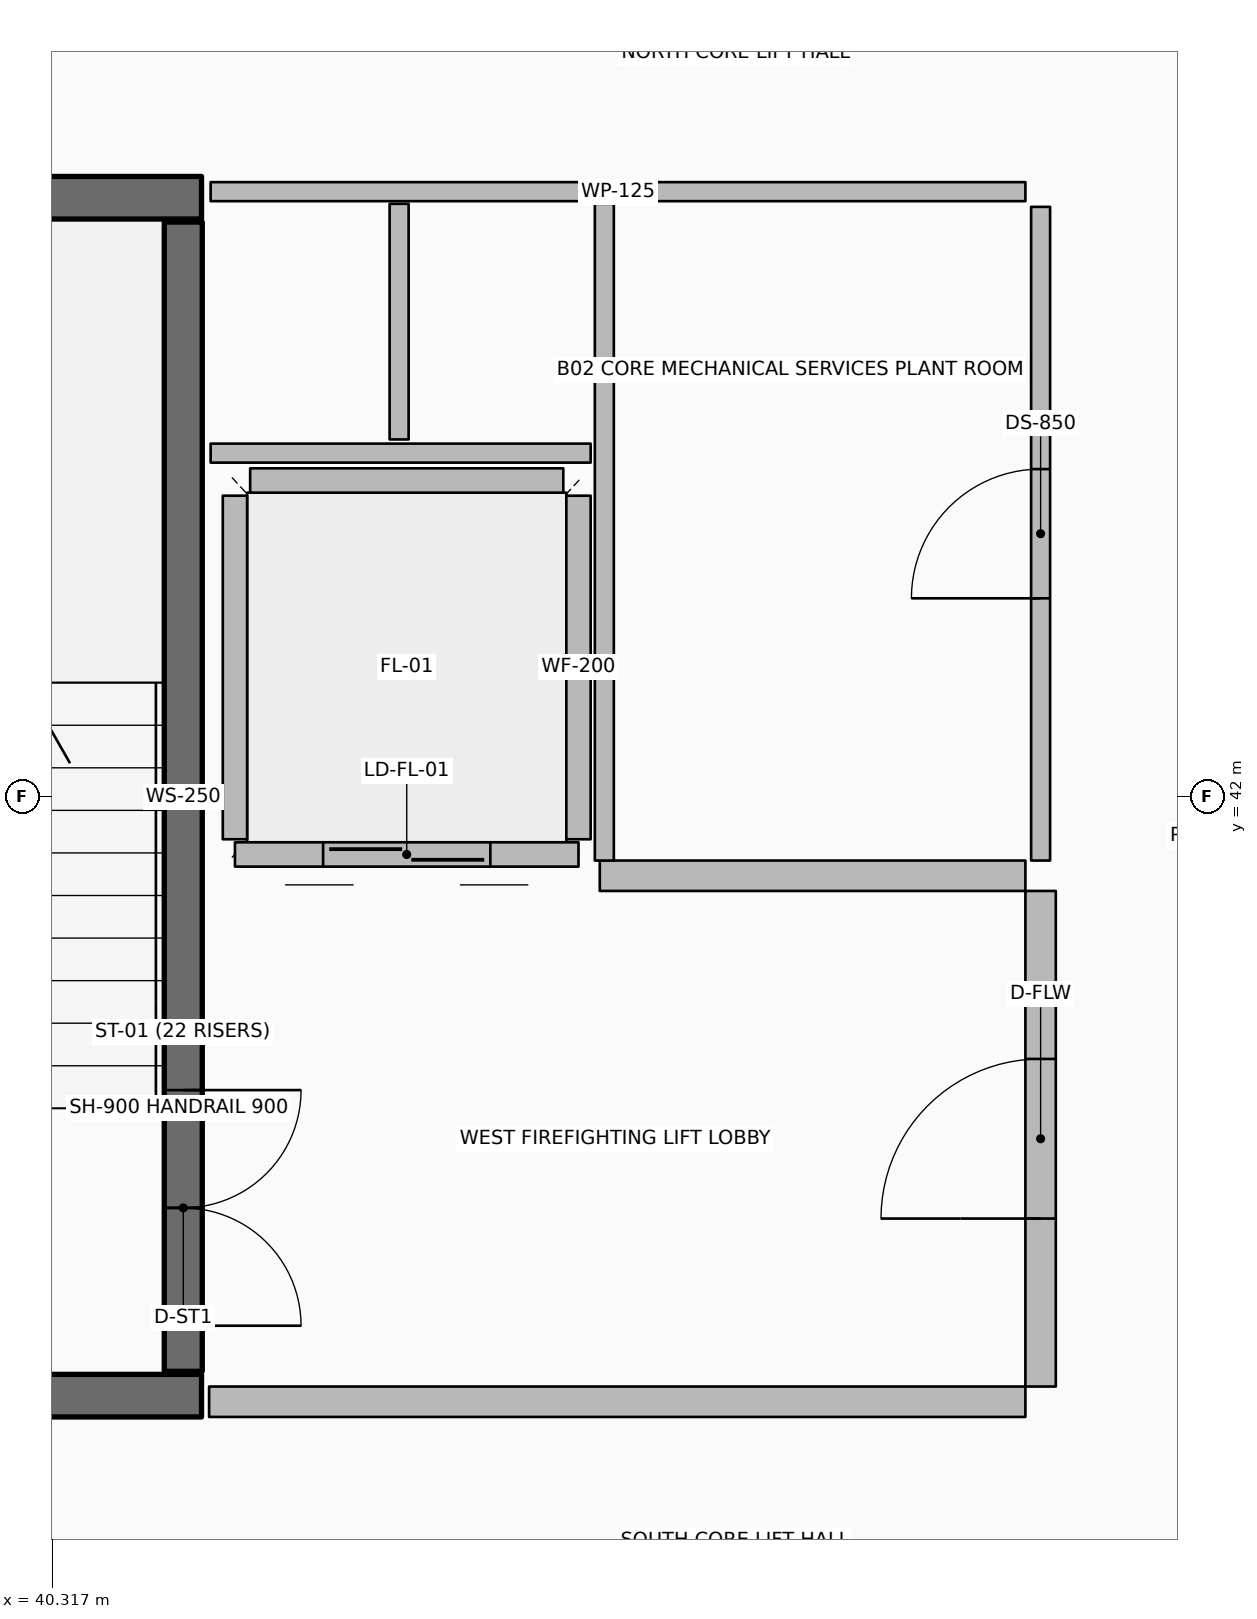
"""IFC4 building model, lengths in metres.
Left out: names, types, materials, properties, quantities, classifications, styles, units other than length and angle.
Written with IfcOpenShell. Run it as: python <this file> out.ifc"""

import sys

from ifc_helpers import new_model, si_unit, direction, frame, frame_2d, origin, origin_2d, place, context, subcontext, project, spatial, rectangle, hollow_rectangle, extrude, element, fill, save


model = new_model("IFC4")
c1 = context("Model", 3, precision=1e-05, world=origin(), true_north=direction((0.0, 1.0)))
c2 = subcontext(c1, "Body", "Model", "MODEL_VIEW")
j1 = project(units=[si_unit("LENGTHUNIT", "METRE"), si_unit("PLANEANGLEUNIT", "RADIAN")], contexts=[c1])
p1 = place(None, origin())
s1 = spatial("IfcSite", under=j1, at=p1, CompositionType="ELEMENT")
p2 = place(p1, origin())
s2 = spatial("IfcBuilding", under=s1, at=p2, CompositionType="ELEMENT")
p3 = place(p2, frame((0.0, 0.0, -7.6)))
s3 = spatial("IfcBuildingStorey", under=s2, at=p3, CompositionType="ELEMENT", Elevation=-7.6)
for number, where, z_axis, x_axis in (
    (1, (37.8, 38.06, 0.0), (0.0, 0.0, 1.0), (1.0, 0.0, 0.0)),
    (2, (37.8, 45.94, 0.0), (0.0, 0.0, 1.0), (1.0, 0.0, 0.0)),
):
    element("IfcWall", number, at=place(p3, frame(where, z_axis=z_axis, x_axis=x_axis)), inside=s3, PredefinedType="SHEAR", context=c2, shape_type="SweptSolid", body=[
        extrude(rectangle(XDim=3.5, YDim=0.28, at=frame_2d((1.75, 0.0))), origin(), (0.0, 0.0, 1.0), 3.8),
    ])
p4 = place(p3, frame((41.18, 42.75, 0.0), z_axis=(0.0, 0.0, 1.0), x_axis=(1.0, 0.0, 0.0)))
e3 = element("IfcColumn", 3, at=p4, inside=s3, PredefinedType="COLUMN", context=c2, shape_type="SweptSolid", body=[
    extrude(hollow_rectangle(XDim=0.2, YDim=0.2, WallThickness=0.01, InnerFilletRadius=0.01, OuterFilletRadius=0.02, at=origin_2d()), origin(), (0.0, 0.0, 1.0), 1.695),
])
p5 = place(p3, frame((41.18, 38.22, 0.0), z_axis=(0.0, 0.0, 1.0), x_axis=(0.0, 1.0, 0.0)))
e4 = element("IfcWall", 4, at=p5, inside=s3, PredefinedType="SOLIDWALL", context=c2, shape_type="SweptSolid", body=[
    extrude(rectangle(XDim=7.56, YDim=0.25, at=frame_2d((3.78, 0.0))), origin(), (0.0, 0.0, 1.0), 3.52),
])
p6 = place(p5, frame((0.3, 0.0, 0.0)))
e5 = element("IfcOpeningElement", 5, at=p6, cuts=e4, PredefinedType="OPENING", context=c2, shape_type="SweptSolid", body=[
    extrude(rectangle(XDim=1.55, YDim=2.15, at=frame_2d((0.775, 1.075))), frame((0.0, 0.135, 0.0), z_axis=(0.0, -1.0, 0.0), x_axis=(1.0, 0.0, 0.0)), (0.0, 0.0, 1.0), 0.27),
])
p7 = place(p3, frame((43.78, 41.62, 0.0), z_axis=(0.0, 0.0, 1.0), x_axis=(-1.0, 0.0, 0.0)))
e6 = element("IfcWall", 6, at=p7, inside=s3, PredefinedType="PARTITIONING", context=c2, shape_type="SweptSolid", body=[
    extrude(rectangle(XDim=2.26, YDim=0.16, at=frame_2d((1.13, 0.0))), origin(), (0.0, 0.0, 1.0), 3.52),
])
p8 = place(p7, frame((0.58, 0.0, 0.0)))
e7 = element("IfcOpeningElement", 7, at=p8, cuts=e6, PredefinedType="OPENING", context=c2, shape_type="SweptSolid", body=[
    extrude(rectangle(XDim=1.1, YDim=2.1, at=frame_2d((0.55, 1.05))), frame((0.0, 0.09, 0.0), z_axis=(0.0, -1.0, 0.0), x_axis=(1.0, 0.0, 0.0)), (0.0, 0.0, 1.0), 0.18),
])
for number, where, z_axis, x_axis in (
    (8, (43.78, 41.72, 0.0), (0.0, 0.0, 1.0), (0.0, 1.0, 0.0)),
    (9, (41.52, 41.72, 0.0), (0.0, 0.0, 1.0), (0.0, 1.0, 0.0)),
):
    element("IfcWall", number, at=place(p3, frame(where, z_axis=z_axis, x_axis=x_axis)), inside=s3, PredefinedType="PARTITIONING", context=c2, shape_type="SweptSolid", body=[
        extrude(rectangle(XDim=2.26, YDim=0.16, at=frame_2d((1.13, 0.0))), origin(), (0.0, 0.0, 1.0), 3.52),
    ])
p9 = place(p3, frame((41.62, 44.08, 0.0), z_axis=(0.0, 0.0, 1.0), x_axis=(1.0, 0.0, 0.0)))
e10 = element("IfcWall", 10, at=p9, inside=s3, PredefinedType="PARTITIONING", context=c2, shape_type="SweptSolid", body=[
    extrude(rectangle(XDim=2.06, YDim=0.16, at=frame_2d((1.03, 0.0))), origin(), (0.0, 0.0, 1.0), 3.52),
])
p10 = place(p3, frame((41.35, 38.02, 0.0), z_axis=(0.0, 0.0, 1.0), x_axis=(1.0, 0.0, 0.0)))
e11 = element("IfcWall", 11, at=p10, inside=s3, PredefinedType="PARTITIONING", context=c2, shape_type="SweptSolid", body=[
    extrude(rectangle(XDim=5.37, YDim=0.2, at=frame_2d((2.685, 0.0))), origin(), (0.0, 0.0, 1.0), 3.52),
])
p11 = place(p3, frame((43.92, 41.48, 0.0), z_axis=(0.0, 0.0, 1.0), x_axis=(1.0, 0.0, 0.0)))
e12 = element("IfcWall", 12, at=p11, inside=s3, PredefinedType="PARTITIONING", context=c2, shape_type="SweptSolid", body=[
    extrude(rectangle(XDim=2.8, YDim=0.2, at=frame_2d((1.4, 0.0))), origin(), (0.0, 0.0, 1.0), 3.52),
])
p12 = place(p3, frame((46.82, 38.12, 0.0), z_axis=(0.0, 0.0, 1.0), x_axis=(0.0, 1.0, 0.0)))
e13 = element("IfcWall", 13, at=p12, inside=s3, PredefinedType="PARTITIONING", context=c2, shape_type="SweptSolid", body=[
    extrude(rectangle(XDim=3.26, YDim=0.2, at=frame_2d((1.63, 0.0))), origin(), (0.0, 0.0, 1.0), 3.52),
])
p13 = place(p12, frame((1.105, 0.0, 0.0)))
e14 = element("IfcOpeningElement", 14, at=p13, cuts=e13, PredefinedType="OPENING", context=c2, shape_type="SweptSolid", body=[
    extrude(rectangle(XDim=1.05, YDim=2.1, at=frame_2d((0.525, 1.05))), frame((0.0, 0.11, 0.0), z_axis=(0.0, -1.0, 0.0), x_axis=(1.0, 0.0, 0.0)), (0.0, 0.0, 1.0), 0.22),
])
p14 = place(p3, frame((41.36, 45.98, 0.0), z_axis=(0.0, 0.0, 1.0), x_axis=(1.0, 0.0, 0.0)))
e15 = element("IfcWall", 15, at=p14, inside=s3, PredefinedType="PARTITIONING", context=c2, shape_type="SweptSolid", body=[
    extrude(rectangle(XDim=5.36, YDim=0.125, at=frame_2d((2.68, 0.0))), origin(), (0.0, 0.0, 1.0), 2.96),
])
p15 = place(p3, frame((41.36, 44.26, 0.0), z_axis=(0.0, 0.0, 1.0), x_axis=(1.0, 0.0, 0.0)))
e16 = element("IfcWall", 16, at=p15, inside=s3, PredefinedType="PARTITIONING", context=c2, shape_type="SweptSolid", body=[
    extrude(rectangle(XDim=2.5, YDim=0.125, at=frame_2d((1.25, 0.0))), origin(), (0.0, 0.0, 1.0), 2.96),
])
p16 = place(p3, frame((42.6, 44.35, 0.0), z_axis=(0.0, 0.0, 1.0), x_axis=(0.0, 1.0, 0.0)))
e17 = element("IfcWall", 17, at=p16, inside=s3, PredefinedType="PARTITIONING", context=c2, shape_type="SweptSolid", body=[
    extrude(rectangle(XDim=1.55, YDim=0.125, at=frame_2d((0.775, 0.0))), origin(), (0.0, 0.0, 1.0), 2.96),
])
p17 = place(p3, frame((43.95, 41.58, 0.0), z_axis=(0.0, 0.0, 1.0), x_axis=(0.0, 1.0, 0.0)))
e18 = element("IfcWall", 18, at=p17, inside=s3, PredefinedType="PARTITIONING", context=c2, shape_type="SweptSolid", body=[
    extrude(rectangle(XDim=4.32, YDim=0.125, at=frame_2d((2.16, 0.0))), origin(), (0.0, 0.0, 1.0), 2.96),
])
p18 = place(p3, frame((46.82, 41.58, 0.0), z_axis=(0.0, 0.0, 1.0), x_axis=(0.0, 1.0, 0.0)))
e19 = element("IfcWall", 19, at=p18, inside=s3, PredefinedType="PARTITIONING", context=c2, shape_type="SweptSolid", body=[
    extrude(rectangle(XDim=4.3, YDim=0.125, at=frame_2d((2.15, 0.0))), origin(), (0.0, 0.0, 1.0), 2.96),
])
p19 = place(p18, frame((1.725, 0.0, 0.0)))
e20 = element("IfcOpeningElement", 20, at=p19, cuts=e19, PredefinedType="OPENING", context=c2, shape_type="SweptSolid", body=[
    extrude(rectangle(XDim=0.85, YDim=2.06, at=frame_2d((0.425, 1.03))), frame((0.0, 0.073, 0.0), z_axis=(0.0, -1.0, 0.0), x_axis=(1.0, 0.0, 0.0)), (0.0, 0.0, 1.0), 0.145),
])
p20 = place(p6, origin())
e21 = element("IfcDoor", 21, at=p20, inside=s3, OperationType="DOUBLE_DOOR_SINGLE_SWING", PredefinedType="DOOR", context=c2, shape_type="SweptSolid", body=[
    extrude(rectangle(XDim=1.55, YDim=2.15, at=frame_2d((0.775, 1.075))), frame((0.0, 0.025, 0.0), z_axis=(0.0, -1.0, 0.0), x_axis=(1.0, 0.0, 0.0)), (0.0, 0.0, 1.0), 0.05),
])
fill(e5, e21)
p21 = place(p8, origin())
e22 = element("IfcDoor", 22, at=p21, inside=s3, OperationType="DOUBLE_DOOR_SLIDING", PredefinedType="DOOR", context=c2, shape_type="SweptSolid", body=[
    extrude(rectangle(XDim=1.1, YDim=2.1, at=frame_2d((0.55, 1.05))), frame((0.0, 0.025, 0.0), z_axis=(0.0, -1.0, 0.0), x_axis=(1.0, 0.0, 0.0)), (0.0, 0.0, 1.0), 0.05),
])
fill(e7, e22)
p22 = place(p13, origin())
e23 = element("IfcDoor", 23, at=p22, inside=s3, OperationType="SINGLE_SWING_LEFT", PredefinedType="DOOR", context=c2, shape_type="SweptSolid", body=[
    extrude(rectangle(XDim=1.05, YDim=2.1, at=frame_2d((0.525, 1.05))), frame((0.0, 0.025, 0.0), z_axis=(0.0, -1.0, 0.0), x_axis=(1.0, 0.0, 0.0)), (0.0, 0.0, 1.0), 0.05),
])
fill(e14, e23)
p23 = place(p19, origin())
e24 = element("IfcDoor", 24, at=p23, inside=s3, OperationType="SINGLE_SWING_LEFT", PredefinedType="DOOR", context=c2, shape_type="SweptSolid", body=[
    extrude(rectangle(XDim=0.85, YDim=2.06, at=frame_2d((0.425, 1.03))), frame((0.0, 0.025, 0.0), z_axis=(0.0, -1.0, 0.0), x_axis=(1.0, 0.0, 0.0)), (0.0, 0.0, 1.0), 0.05),
])
fill(e20, e24)
save(model, sys.argv[1])
